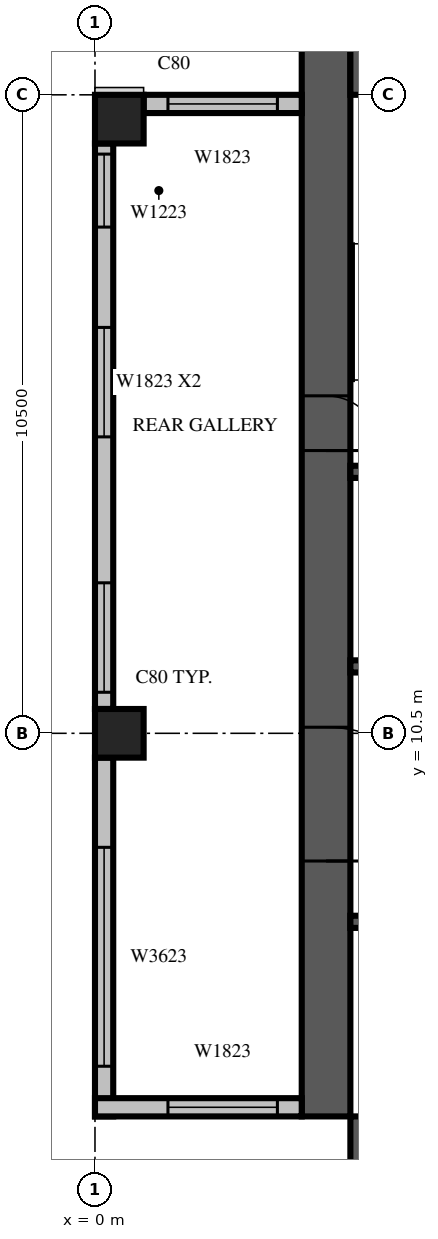
"""IFC4 building model, lengths in metres.
Left out: names, types, materials, properties, quantities, classifications, styles, units other than length and angle.
Written with IfcOpenShell. Run it as: python <this file> out.ifc"""

import sys

from ifc_helpers import new_model, si_unit, direction, frame, frame_2d, origin, origin_2d, place, context, subcontext, project, spatial, rectangle, extrude, source, transform, mapped, element, fill, save


model = new_model("IFC4")
c1 = context("Model", 3, precision=1e-05, world=origin(), true_north=direction((0.0, 1.0)))
c2 = subcontext(c1, "Body", "Model", "MODEL_VIEW")
j1 = project(units=[si_unit("LENGTHUNIT", "METRE"), si_unit("PLANEANGLEUNIT", "RADIAN")], contexts=[c1])
p1 = place(None, origin())
s1 = spatial("IfcSite", under=j1, at=p1, CompositionType="ELEMENT")
p2 = place(p1, origin())
s2 = spatial("IfcBuilding", under=s1, at=p2, CompositionType="ELEMENT")
p3 = place(p2, frame((0.0, 0.0, 242.4)))
s3 = spatial("IfcBuildingStorey", under=s2, at=p3, CompositionType="ELEMENT", Elevation=242.4)
m1 = source(origin(), c2, "Body", "SweptSolid", [
    extrude(rectangle(XDim=0.8, YDim=0.8, at=origin_2d()), origin(), (0.0, 0.0, 1.0), 3.8),
])
for number, where, z_axis, x_axis in (
    (1, (0.4, 10.5, 0.0), (0.0, 0.0, 1.0), (1.0, 0.0, 0.0)),
    (2, (0.4, 20.6, 0.0), (0.0, 0.0, 1.0), (1.0, 0.0, 0.0)),
):
    element("IfcColumn", number, at=place(p3, frame(where, z_axis=z_axis, x_axis=x_axis)), inside=s3, PredefinedType="COLUMN", context=c2, shape_type="MappedRepresentation", body=[
        mapped(m1, transform((0.0, 0.0, 0.0), scale=1.0)),
    ])
m2 = source(origin(), c2, "Body", "SweptSolid", [
    extrude(rectangle(XDim=17.6, YDim=0.8, at=frame_2d((8.8, 0.0))), origin(), (0.0, 0.0, 1.0), 3.8),
])
p4 = place(p3, frame((3.8, 4.2, 0.0), z_axis=(0.0, 0.0, 1.0), x_axis=(0.0, 1.0, 0.0)))
e3 = element("IfcWall", 3, at=p4, inside=s3, PredefinedType="SHEAR", context=c2, shape_type="MappedRepresentation", body=[
    mapped(m2, transform((0.0, 0.0, 0.0), scale=1.0)),
])
m3 = source(origin(), c2, "Body", "SweptSolid", [
    extrude(rectangle(XDim=2.2, YDim=2.1, at=frame_2d((1.1, 1.05))), frame((0.0, 0.41, 0.0), z_axis=(0.0, -1.0, 0.0), x_axis=(1.0, 0.0, 0.0)), (0.0, 0.0, 1.0), 0.82),
])
p5 = place(p4, frame((4.2, 0.0, 0.0)))
e4 = element("IfcOpeningElement", 4, at=p5, cuts=e3, PredefinedType="OPENING", context=c2, shape_type="MappedRepresentation", body=[
    mapped(m3, transform((0.0, 0.0, 0.0), scale=1.0)),
])
m4 = source(origin(), c2, "Body", "SweptSolid", [
    extrude(rectangle(XDim=0.9, YDim=2.1, at=frame_2d((0.45, 1.05))), frame((0.0, 0.41, 0.0), z_axis=(0.0, -1.0, 0.0), x_axis=(1.0, 0.0, 0.0)), (0.0, 0.0, 1.0), 0.82),
])
p6 = place(p4, frame((10.95, 0.0, 0.0)))
e5 = element("IfcOpeningElement", 5, at=p6, cuts=e3, PredefinedType="OPENING", context=c2, shape_type="MappedRepresentation", body=[
    mapped(m4, transform((0.0, 0.0, 0.0), scale=1.0)),
])
p7 = place(p3, frame((4.2, 3.8, 0.0), z_axis=(0.0, 0.0, 1.0), x_axis=(1.0, 0.0, 0.0)))
e6 = element("IfcWall", 6, at=p7, inside=s3, PredefinedType="SHEAR", context=c2, shape_type="MappedRepresentation", body=[
    mapped(m2, transform((0.0, 0.0, 0.0), scale=1.0)),
])
p8 = place(p7, frame((12.75, 0.0, 0.0)))
e7 = element("IfcOpeningElement", 7, at=p8, cuts=e6, PredefinedType="OPENING", context=c2, shape_type="MappedRepresentation", body=[
    mapped(m4, transform((0.0, 0.0, 0.0), scale=1.0)),
])
m5 = source(origin(), c2, "Body", "SweptSolid", [
    extrude(rectangle(XDim=16.8, YDim=0.8, at=frame_2d((8.4, 0.0))), origin(), (0.0, 0.0, 1.0), 3.8),
])
p9 = place(p3, frame((4.2, 21.4, 0.0), z_axis=(0.0, 0.0, 1.0), x_axis=(1.0, 0.0, 0.0)))
e8 = element("IfcWall", 8, at=p9, inside=s3, PredefinedType="SHEAR", context=c2, shape_type="MappedRepresentation", body=[
    mapped(m5, transform((0.0, 0.0, 0.0), scale=1.0)),
])
m6 = source(origin(), c2, "Body", "SweptSolid", [
    extrude(rectangle(XDim=1.2, YDim=2.1, at=frame_2d((0.6, 1.05))), frame((0.0, 0.41, 0.0), z_axis=(0.0, -1.0, 0.0), x_axis=(1.0, 0.0, 0.0)), (0.0, 0.0, 1.0), 0.82),
])
p10 = place(p9, frame((6.2, 0.0, 0.0)))
e9 = element("IfcOpeningElement", 9, at=p10, cuts=e8, PredefinedType="OPENING", context=c2, shape_type="MappedRepresentation", body=[
    mapped(m6, transform((0.0, 0.0, 0.0), scale=1.0)),
])
m7 = source(origin(), c2, "Body", "SweptSolid", [
    extrude(rectangle(XDim=2.6, YDim=0.3, at=frame_2d((1.3, 0.0))), origin(), (0.0, 0.0, 1.0), 3.4),
])
p11 = place(p3, frame((3.4, 20.85, 0.0), z_axis=(0.0, 0.0, 1.0), x_axis=(-1.0, 0.0, 0.0)))
e10 = element("IfcWall", 10, at=p11, inside=s3, PredefinedType="STANDARD", context=c2, shape_type="MappedRepresentation", body=[
    mapped(m7, transform((0.0, 0.0, 0.0), scale=1.0)),
])
m8 = source(origin(), c2, "Body", "SweptSolid", [
    extrude(rectangle(XDim=1.8, YDim=2.3, at=frame_2d((0.9, 1.15))), frame((0.0, 0.16, 0.0), z_axis=(0.0, -1.0, 0.0), x_axis=(1.0, 0.0, 0.0)), (0.0, 0.0, 1.0), 0.32),
])
p12 = place(p11, frame((0.4, 0.0, 0.6)))
e11 = element("IfcOpeningElement", 11, at=p12, cuts=e10, PredefinedType="OPENING", context=c2, shape_type="MappedRepresentation", body=[
    mapped(m8, transform((0.0, 0.0, 0.0), scale=1.0)),
])
m9 = source(origin(), c2, "Body", "SweptSolid", [
    extrude(rectangle(XDim=9.3, YDim=0.3, at=frame_2d((4.65, 0.0))), origin(), (0.0, 0.0, 1.0), 3.4),
])
p13 = place(p3, frame((0.15, 20.2, 0.0), z_axis=(0.0, 0.0, 1.0), x_axis=(0.0, -1.0, 0.0)))
e12 = element("IfcWall", 12, at=p13, inside=s3, PredefinedType="STANDARD", context=c2, shape_type="MappedRepresentation", body=[
    mapped(m9, transform((0.0, 0.0, 0.0), scale=1.0)),
])
m10 = source(origin(), c2, "Body", "SweptSolid", [
    extrude(rectangle(XDim=1.2, YDim=2.3, at=frame_2d((0.6, 1.15))), frame((0.0, 0.16, 0.0), z_axis=(0.0, -1.0, 0.0), x_axis=(1.0, 0.0, 0.0)), (0.0, 0.0, 1.0), 0.32),
])
p14 = place(p13, frame((0.175, 0.0, 0.6)))
e13 = element("IfcOpeningElement", 13, at=p14, cuts=e12, PredefinedType="OPENING", context=c2, shape_type="MappedRepresentation", body=[
    mapped(m10, transform((0.0, 0.0, 0.0), scale=1.0)),
])
p15 = place(p13, frame((3.025, 0.0, 0.6)))
e14 = element("IfcOpeningElement", 14, at=p15, cuts=e12, PredefinedType="OPENING", context=c2, shape_type="MappedRepresentation", body=[
    mapped(m8, transform((0.0, 0.0, 0.0), scale=1.0)),
])
p16 = place(p13, frame((7.225, 0.0, 0.6)))
e15 = element("IfcOpeningElement", 15, at=p16, cuts=e12, PredefinedType="OPENING", context=c2, shape_type="MappedRepresentation", body=[
    mapped(m8, transform((0.0, 0.0, 0.0), scale=1.0)),
])
m11 = source(origin(), c2, "Body", "SweptSolid", [
    extrude(rectangle(XDim=5.9, YDim=0.3, at=frame_2d((2.95, 0.0))), origin(), (0.0, 0.0, 1.0), 3.4),
])
p17 = place(p3, frame((0.15, 10.1, 0.0), z_axis=(0.0, 0.0, 1.0), x_axis=(0.0, -1.0, 0.0)))
e16 = element("IfcWall", 16, at=p17, inside=s3, PredefinedType="STANDARD", context=c2, shape_type="MappedRepresentation", body=[
    mapped(m11, transform((0.0, 0.0, 0.0), scale=1.0)),
])
m12 = source(origin(), c2, "Body", "SweptSolid", [
    extrude(rectangle(XDim=3.6, YDim=2.3, at=frame_2d((1.8, 1.15))), frame((0.0, 0.16, 0.0), z_axis=(0.0, -1.0, 0.0), x_axis=(1.0, 0.0, 0.0)), (0.0, 0.0, 1.0), 0.32),
])
p18 = place(p17, frame((1.475, 0.0, 0.6)))
e17 = element("IfcOpeningElement", 17, at=p18, cuts=e16, PredefinedType="OPENING", context=c2, shape_type="MappedRepresentation", body=[
    mapped(m12, transform((0.0, 0.0, 0.0), scale=1.0)),
])
m13 = source(origin(), c2, "Body", "SweptSolid", [
    extrude(rectangle(XDim=3.4, YDim=0.3, at=frame_2d((1.7, 0.0))), origin(), (0.0, 0.0, 1.0), 3.4),
])
p19 = place(p3, frame((0.0, 4.35, 0.0), z_axis=(0.0, 0.0, 1.0), x_axis=(1.0, 0.0, 0.0)))
e18 = element("IfcWall", 18, at=p19, inside=s3, PredefinedType="STANDARD", context=c2, shape_type="MappedRepresentation", body=[
    mapped(m13, transform((0.0, 0.0, 0.0), scale=1.0)),
])
p20 = place(p19, frame((1.2, 0.0, 0.6)))
e19 = element("IfcOpeningElement", 19, at=p20, cuts=e18, PredefinedType="OPENING", context=c2, shape_type="MappedRepresentation", body=[
    mapped(m8, transform((0.0, 0.0, 0.0), scale=1.0)),
])
m14 = source(origin(), c2, "Body", "SweptSolid", [
    extrude(rectangle(XDim=9.6, YDim=0.2, at=frame_2d((4.8, 0.0))), origin(), (0.0, 0.0, 1.0), 3.8),
])
p21 = place(p3, frame((4.2, 7.4, 0.0), z_axis=(0.0, 0.0, 1.0), x_axis=(1.0, 0.0, 0.0)))
e20 = element("IfcWall", 20, at=p21, inside=s3, PredefinedType="SOLIDWALL", context=c2, shape_type="MappedRepresentation", body=[
    mapped(m14, transform((0.0, 0.0, 0.0), scale=1.0)),
])
m15 = source(origin(), c2, "Body", "SweptSolid", [
    extrude(rectangle(XDim=1.1, YDim=2.1, at=frame_2d((0.55, 1.05))), frame((0.0, 0.11, 0.0), z_axis=(0.0, -1.0, 0.0), x_axis=(1.0, 0.0, 0.0)), (0.0, 0.0, 1.0), 0.22),
])
p22 = place(p21, frame((0.65, 0.0, 0.0)))
e21 = element("IfcOpeningElement", 21, at=p22, cuts=e20, PredefinedType="OPENING", context=c2, shape_type="MappedRepresentation", body=[
    mapped(m15, transform((0.0, 0.0, 0.0), scale=1.0)),
])
p23 = place(p21, frame((3.05, 0.0, 0.0)))
e22 = element("IfcOpeningElement", 22, at=p23, cuts=e20, PredefinedType="OPENING", context=c2, shape_type="MappedRepresentation", body=[
    mapped(m15, transform((0.0, 0.0, 0.0), scale=1.0)),
])
p24 = place(p21, frame((5.45, 0.0, 0.0)))
e23 = element("IfcOpeningElement", 23, at=p24, cuts=e20, PredefinedType="OPENING", context=c2, shape_type="MappedRepresentation", body=[
    mapped(m15, transform((0.0, 0.0, 0.0), scale=1.0)),
])
p25 = place(p21, frame((7.85, 0.0, 0.0)))
e24 = element("IfcOpeningElement", 24, at=p25, cuts=e20, PredefinedType="OPENING", context=c2, shape_type="MappedRepresentation", body=[
    mapped(m15, transform((0.0, 0.0, 0.0), scale=1.0)),
])
m16 = source(origin(), c2, "Body", "SweptSolid", [
    extrude(rectangle(XDim=4.8, YDim=0.2, at=frame_2d((2.4, 0.0))), origin(), (0.0, 0.0, 1.0), 3.8),
])
p26 = place(p3, frame((4.2, 11.6, 0.0), z_axis=(0.0, 0.0, 1.0), x_axis=(1.0, 0.0, 0.0)))
e25 = element("IfcWall", 25, at=p26, inside=s3, PredefinedType="SOLIDWALL", context=c2, shape_type="MappedRepresentation", body=[
    mapped(m16, transform((0.0, 0.0, 0.0), scale=1.0)),
])
p27 = place(p26, frame((0.65, 0.0, 0.0)))
e26 = element("IfcOpeningElement", 26, at=p27, cuts=e25, PredefinedType="OPENING", context=c2, shape_type="MappedRepresentation", body=[
    mapped(m15, transform((0.0, 0.0, 0.0), scale=1.0)),
])
p28 = place(p26, frame((3.05, 0.0, 0.0)))
e27 = element("IfcOpeningElement", 27, at=p28, cuts=e25, PredefinedType="OPENING", context=c2, shape_type="MappedRepresentation", body=[
    mapped(m15, transform((0.0, 0.0, 0.0), scale=1.0)),
])
p29 = place(p3, frame((4.2, 14.8, 0.0), z_axis=(0.0, 0.0, 1.0), x_axis=(1.0, 0.0, 0.0)))
e28 = element("IfcWall", 28, at=p29, inside=s3, PredefinedType="SOLIDWALL", context=c2, shape_type="MappedRepresentation", body=[
    mapped(m16, transform((0.0, 0.0, 0.0), scale=1.0)),
])
m17 = source(origin(), c2, "Body", "SweptSolid", [
    extrude(rectangle(XDim=1.8, YDim=2.3, at=frame_2d((0.9, 1.15))), frame((0.0, 0.03, 0.0), z_axis=(0.0, -1.0, 0.0), x_axis=(1.0, 0.0, 0.0)), (0.0, 0.0, 1.0), 0.06),
])
p30 = place(p12, origin())
e29 = element("IfcWindow", 29, at=p30, inside=s3, PartitioningType="SINGLE_PANEL", PredefinedType="WINDOW", context=c2, shape_type="MappedRepresentation", body=[
    mapped(m17, transform((0.0, 0.0, 0.0), scale=1.0)),
])
fill(e11, e29)
m18 = source(origin(), c2, "Body", "SweptSolid", [
    extrude(rectangle(XDim=1.2, YDim=2.3, at=frame_2d((0.6, 1.15))), frame((0.0, 0.03, 0.0), z_axis=(0.0, -1.0, 0.0), x_axis=(1.0, 0.0, 0.0)), (0.0, 0.0, 1.0), 0.06),
])
p31 = place(p14, origin())
e30 = element("IfcWindow", 30, at=p31, inside=s3, PartitioningType="SINGLE_PANEL", PredefinedType="WINDOW", context=c2, shape_type="MappedRepresentation", body=[
    mapped(m18, transform((0.0, 0.0, 0.0), scale=1.0)),
])
fill(e13, e30)
p32 = place(p15, origin())
e31 = element("IfcWindow", 31, at=p32, inside=s3, PartitioningType="SINGLE_PANEL", PredefinedType="WINDOW", context=c2, shape_type="MappedRepresentation", body=[
    mapped(m17, transform((0.0, 0.0, 0.0), scale=1.0)),
])
fill(e14, e31)
p33 = place(p16, origin())
e32 = element("IfcWindow", 32, at=p33, inside=s3, PartitioningType="SINGLE_PANEL", PredefinedType="WINDOW", context=c2, shape_type="MappedRepresentation", body=[
    mapped(m17, transform((0.0, 0.0, 0.0), scale=1.0)),
])
fill(e15, e32)
m19 = source(origin(), c2, "Body", "SweptSolid", [
    extrude(rectangle(XDim=3.6, YDim=2.3, at=frame_2d((1.8, 1.15))), frame((0.0, 0.03, 0.0), z_axis=(0.0, -1.0, 0.0), x_axis=(1.0, 0.0, 0.0)), (0.0, 0.0, 1.0), 0.06),
])
p34 = place(p18, origin())
e33 = element("IfcWindow", 33, at=p34, inside=s3, PartitioningType="SINGLE_PANEL", PredefinedType="WINDOW", context=c2, shape_type="MappedRepresentation", body=[
    mapped(m19, transform((0.0, 0.0, 0.0), scale=1.0)),
])
fill(e17, e33)
p35 = place(p20, origin())
e34 = element("IfcWindow", 34, at=p35, inside=s3, PartitioningType="SINGLE_PANEL", PredefinedType="WINDOW", context=c2, shape_type="MappedRepresentation", body=[
    mapped(m17, transform((0.0, 0.0, 0.0), scale=1.0)),
])
fill(e19, e34)
m20 = source(origin(), c2, "Body", "SweptSolid", [
    extrude(rectangle(XDim=2.2, YDim=2.1, at=frame_2d((1.1, 1.05))), frame((0.0, 0.025, 0.0), z_axis=(0.0, -1.0, 0.0), x_axis=(1.0, 0.0, 0.0)), (0.0, 0.0, 1.0), 0.05),
])
p36 = place(p5, origin())
e35 = element("IfcDoor", 35, at=p36, inside=s3, OperationType="DOUBLE_DOOR_SINGLE_SWING", PredefinedType="DOOR", context=c2, shape_type="MappedRepresentation", body=[
    mapped(m20, transform((0.0, 0.0, 0.0), scale=1.0)),
])
fill(e4, e35)
m21 = source(origin(), c2, "Body", "SweptSolid", [
    extrude(rectangle(XDim=0.9, YDim=2.1, at=frame_2d((0.45, 1.05))), frame((0.0, 0.025, 0.0), z_axis=(0.0, -1.0, 0.0), x_axis=(1.0, 0.0, 0.0)), (0.0, 0.0, 1.0), 0.05),
])
p37 = place(p6, origin())
e36 = element("IfcDoor", 36, at=p37, inside=s3, OperationType="SINGLE_SWING_RIGHT", PredefinedType="DOOR", context=c2, shape_type="MappedRepresentation", body=[
    mapped(m21, transform((0.0, 0.0, 0.0), scale=1.0)),
])
fill(e5, e36)
save(model, sys.argv[1])
